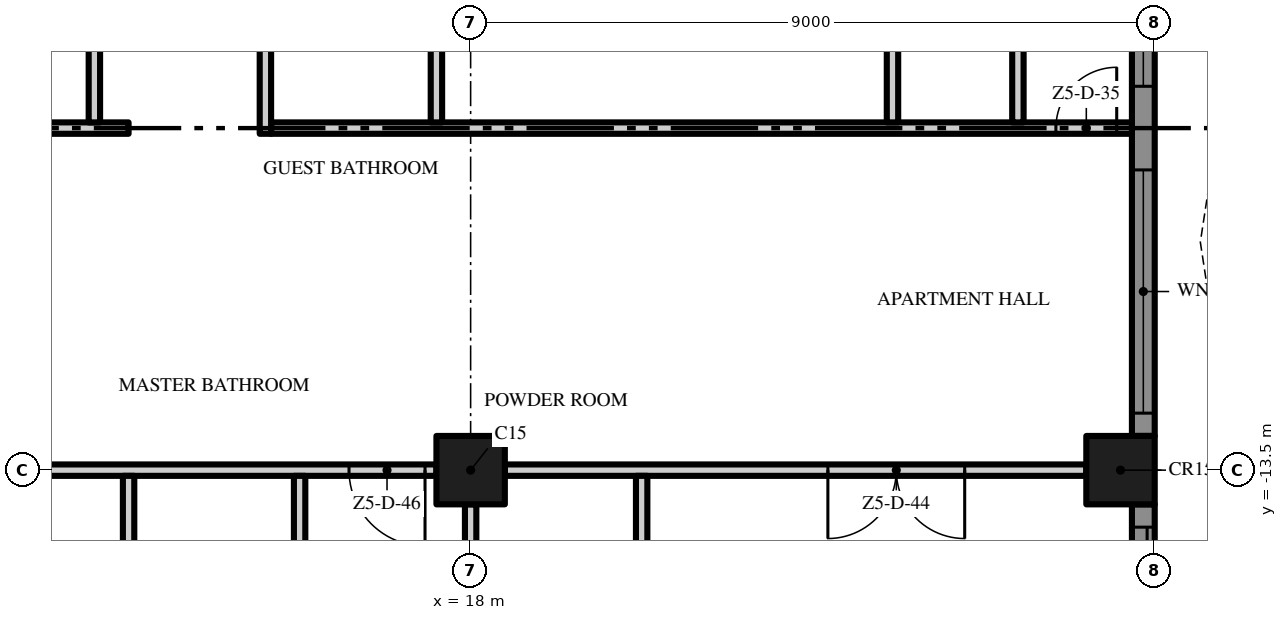
"""IFC4 building model, lengths in metres.
Left out: names, types, materials, properties, quantities, classifications, styles, units other than length and angle.
Written with IfcOpenShell. Run it as: python <this file> out.ifc"""

import sys

from ifc_helpers import new_model, si_unit, direction, frame, frame_2d, origin, origin_2d, place, context, subcontext, project, spatial, polyline, rectangle, outline, extrude, element, fill, save


model = new_model("IFC4")
c1 = context("Model", 3, precision=1e-05, world=origin(), true_north=direction((0.0, 1.0)))
c2 = subcontext(c1, "Body", "Model", "MODEL_VIEW")
j1 = project(units=[si_unit("LENGTHUNIT", "METRE"), si_unit("PLANEANGLEUNIT", "RADIAN")], contexts=[c1])
p1 = place(None, origin())
s1 = spatial("IfcSite", under=j1, at=p1, CompositionType="ELEMENT")
p2 = place(p1, origin())
s2 = spatial("IfcBuilding", under=s1, at=p2, CompositionType="ELEMENT")
p3 = place(p2, frame((0.0, 0.0, 280.6)))
s3 = spatial("IfcBuildingStorey", under=s2, at=p3, CompositionType="ELEMENT", Elevation=280.6)
for number, where, z_axis, x_axis in (
    (1, (18.0, -13.5, 0.0), (0.0, 0.0, 1.0), (1.0, 0.0, 0.0)),
    (2, (26.55, -13.5, 0.0), (0.0, 0.0, 1.0), (1.0, 0.0, 0.0)),
):
    element("IfcColumn", number, at=place(p3, frame(where, z_axis=z_axis, x_axis=x_axis)), inside=s3, PredefinedType="COLUMN", context=c2, shape_type="SweptSolid", body=[
        extrude(rectangle(XDim=0.9, YDim=0.9, at=origin_2d()), origin(), (0.0, 0.0, 1.0), 3.5),
    ])
p4 = place(p3, frame((26.85, -13.95, 0.0), z_axis=(0.0, 0.0, 1.0), x_axis=(0.0, -1.0, 0.0)))
e3 = element("IfcWall", 3, at=p4, inside=s3, PredefinedType="SOLIDWALL", context=c2, shape_type="SweptSolid", body=[
    extrude(rectangle(XDim=3.75, YDim=0.3, at=frame_2d((1.875, 0.0))), origin(), (0.0, 0.0, 1.0), 3.5),
])
p5 = place(p4, frame((0.3, 0.0, 0.0)))
e4 = element("IfcOpeningElement", 4, at=p5, cuts=e3, PredefinedType="OPENING", context=c2, shape_type="SweptSolid", body=[
    extrude(rectangle(XDim=3.15, YDim=2.4, at=frame_2d((1.575, 1.2))), frame((0.0, 0.16, 0.0), z_axis=(0.0, -1.0, 0.0), x_axis=(1.0, 0.0, 0.0)), (0.0, 0.0, 1.0), 0.32),
])
p6 = place(p3, frame((26.85, -4.95, 0.0), z_axis=(0.0, 0.0, 1.0), x_axis=(0.0, -1.0, 0.0)))
e5 = element("IfcWall", 5, at=p6, inside=s3, PredefinedType="SOLIDWALL", context=c2, shape_type="SweptSolid", body=[
    extrude(rectangle(XDim=8.1, YDim=0.3, at=frame_2d((4.05, 0.0))), origin(), (0.0, 0.0, 1.0), 3.5),
])
p7 = place(p6, frame((4.6, 0.0, 0.45)))
e6 = element("IfcOpeningElement", 6, at=p7, cuts=e5, PredefinedType="OPENING", context=c2, shape_type="SweptSolid", body=[
    extrude(rectangle(XDim=3.2, YDim=2.65, at=frame_2d((1.6, 1.325))), frame((0.0, 0.16, 0.0), z_axis=(0.0, -1.0, 0.0), x_axis=(1.0, 0.0, 0.0)), (0.0, 0.0, 1.0), 0.32),
])
p8 = place(p6, frame((0.3, 0.0, 0.45)))
e7 = element("IfcOpeningElement", 7, at=p8, cuts=e5, PredefinedType="OPENING", context=c2, shape_type="SweptSolid", body=[
    extrude(rectangle(XDim=3.2, YDim=2.65, at=frame_2d((1.6, 1.325))), frame((0.0, 0.16, 0.0), z_axis=(0.0, -1.0, 0.0), x_axis=(1.0, 0.0, 0.0)), (0.0, 0.0, 1.0), 0.32),
])
p9 = place(p3, origin())
e8 = element("IfcWall", 8, at=p9, inside=s3, PredefinedType="USERDEFINED", context=c2, shape_type="SweptSolid", body=[
    extrude(outline(polyline([(30.0, -18.0), (29.771, -16.5), (29.171, -15.0), (28.429, -13.5), (27.829, -12.0), (27.6, -10.5), (27.829, -9.0), (28.429, -7.5), (29.171, -6.0), (29.771, -4.5), (30.0, -3.0), (29.771, -1.5), (29.171, 0.0), (28.429, 1.5), (27.829, 3.0), (27.6, 4.5), (27.829, 6.0), (28.429, 7.5), (29.171, 9.0), (29.771, 10.5), (30.0, 12.0), (29.771, 13.5), (29.171, 15.0), (28.429, 16.5), (27.829, 18.0), (27.597, 17.907), (28.201, 16.398), (28.942, 14.898), (29.528, 13.434), (29.747, 12.0), (29.528, 10.566), (28.942, 9.102), (28.201, 7.602), (27.586, 6.066), (27.347, 4.5), (27.586, 2.934), (28.201, 1.398), (28.942, -0.102), (29.528, -1.566), (29.747, -3.0), (29.528, -4.434), (28.942, -5.898), (28.201, -7.398), (27.586, -8.934), (27.347, -10.5), (27.586, -12.066), (28.201, -13.602), (28.942, -15.102), (29.528, -16.566), (29.753, -18.038), (30.0, -18.0)])), origin(), (0.0, 0.0, 1.0), 0.9),
])
p10 = place(p3, frame((17.55, -13.5, 0.0), z_axis=(0.0, 0.0, 1.0), x_axis=(-1.0, 0.0, 0.0)))
e9 = element("IfcWall", 9, at=p10, inside=s3, PredefinedType="PARTITIONING", context=c2, shape_type="SweptSolid", body=[
    extrude(rectangle(XDim=8.1, YDim=0.15, at=frame_2d((4.05, 0.0))), origin(), (0.0, 0.0, 1.0), 3.5),
])
p11 = place(p10, frame((0.15, 0.0, 0.0)))
e10 = element("IfcOpeningElement", 10, at=p11, cuts=e9, PredefinedType="OPENING", context=c2, shape_type="SweptSolid", body=[
    extrude(rectangle(XDim=1.0, YDim=2.4, at=frame_2d((0.5, 1.2))), frame((0.0, 0.085, 0.0), z_axis=(0.0, -1.0, 0.0), x_axis=(1.0, 0.0, 0.0)), (0.0, 0.0, 1.0), 0.17),
])
p12 = place(p10, frame((6.95, 0.0, 0.0)))
e11 = element("IfcOpeningElement", 11, at=p12, cuts=e9, PredefinedType="OPENING", context=c2, shape_type="SweptSolid", body=[
    extrude(rectangle(XDim=1.0, YDim=2.4, at=frame_2d((0.5, 1.2))), frame((0.0, 0.085, 0.0), z_axis=(0.0, -1.0, 0.0), x_axis=(1.0, 0.0, 0.0)), (0.0, 0.0, 1.0), 0.17),
])
p13 = place(p3, frame((26.1, -13.5, 0.0), z_axis=(0.0, 0.0, 1.0), x_axis=(-1.0, 0.0, 0.0)))
e12 = element("IfcWall", 12, at=p13, inside=s3, PredefinedType="PARTITIONING", context=c2, shape_type="SweptSolid", body=[
    extrude(rectangle(XDim=7.65, YDim=0.15, at=frame_2d((3.825, 0.0))), origin(), (0.0, 0.0, 1.0), 3.5),
])
p14 = place(p13, frame((1.6, 0.0, 0.0)))
e13 = element("IfcOpeningElement", 13, at=p14, cuts=e12, PredefinedType="OPENING", context=c2, shape_type="SweptSolid", body=[
    extrude(rectangle(XDim=1.8, YDim=2.4, at=frame_2d((0.9, 1.2))), frame((0.0, 0.085, 0.0), z_axis=(0.0, -1.0, 0.0), x_axis=(1.0, 0.0, 0.0)), (0.0, 0.0, 1.0), 0.17),
])
p15 = place(p3, frame((0.1, -9.0, 0.0), z_axis=(0.0, 0.0, 1.0), x_axis=(1.0, 0.0, 0.0)))
e14 = element("IfcWall", 14, at=p15, inside=s3, PredefinedType="PARTITIONING", context=c2, shape_type="SweptSolid", body=[
    extrude(rectangle(XDim=13.4, YDim=0.15, at=frame_2d((6.7, 0.0))), origin(), (0.0, 0.0, 1.0), 3.5),
])
p16 = place(p15, frame((11.2, 0.0, 0.0)))
e15 = element("IfcOpeningElement", 15, at=p16, cuts=e14, PredefinedType="OPENING", context=c2, shape_type="SweptSolid", body=[
    extrude(rectangle(XDim=0.8, YDim=2.0, at=frame_2d((0.4, 1.0))), frame((0.0, 0.085, 0.0), z_axis=(0.0, -1.0, 0.0), x_axis=(1.0, 0.0, 0.0)), (0.0, 0.0, 1.0), 0.17),
])
p17 = place(p15, frame((8.55, 0.0, 0.0)))
e16 = element("IfcOpeningElement", 16, at=p17, cuts=e14, PredefinedType="OPENING", context=c2, shape_type="SweptSolid", body=[
    extrude(rectangle(XDim=0.8, YDim=2.0, at=frame_2d((0.4, 1.0))), frame((0.0, 0.085, 0.0), z_axis=(0.0, -1.0, 0.0), x_axis=(1.0, 0.0, 0.0)), (0.0, 0.0, 1.0), 0.17),
])
p18 = place(p15, frame((5.8, 0.0, 0.0)))
e17 = element("IfcOpeningElement", 17, at=p18, cuts=e14, PredefinedType="OPENING", context=c2, shape_type="SweptSolid", body=[
    extrude(rectangle(XDim=0.8, YDim=2.0, at=frame_2d((0.4, 1.0))), frame((0.0, 0.085, 0.0), z_axis=(0.0, -1.0, 0.0), x_axis=(1.0, 0.0, 0.0)), (0.0, 0.0, 1.0), 0.17),
])
p19 = place(p3, frame((15.375, -9.0, 0.0), z_axis=(0.0, 0.0, 1.0), x_axis=(1.0, 0.0, 0.0)))
e18 = element("IfcWall", 18, at=p19, inside=s3, PredefinedType="PARTITIONING", context=c2, shape_type="SweptSolid", body=[
    extrude(rectangle(XDim=11.325, YDim=0.15, at=frame_2d((5.662, 0.0))), origin(), (0.0, 0.0, 1.0), 3.5),
])
p20 = place(p19, frame((10.325, 0.0, 0.0)))
e19 = element("IfcOpeningElement", 19, at=p20, cuts=e18, PredefinedType="OPENING", context=c2, shape_type="SweptSolid", body=[
    extrude(rectangle(XDim=0.8, YDim=2.0, at=frame_2d((0.4, 1.0))), frame((0.0, 0.085, 0.0), z_axis=(0.0, -1.0, 0.0), x_axis=(1.0, 0.0, 0.0)), (0.0, 0.0, 1.0), 0.17),
])
p21 = place(p3, frame((13.05, -8.925, 0.0), z_axis=(0.0, 0.0, 1.0), x_axis=(0.0, 1.0, 0.0)))
e20 = element("IfcWall", 20, at=p21, inside=s3, PredefinedType="PARTITIONING", context=c2, shape_type="SweptSolid", body=[
    extrude(rectangle(XDim=4.5, YDim=0.15, at=frame_2d((2.25, 0.0))), origin(), (0.0, 0.0, 1.0), 3.5),
])
p22 = place(p3, frame((13.5, -22.2, 0.0), z_axis=(0.0, 0.0, 1.0), x_axis=(0.0, 1.0, 0.0)))
e21 = element("IfcWall", 21, at=p22, inside=s3, PredefinedType="PARTITIONING", context=c2, shape_type="SweptSolid", body=[
    extrude(rectangle(XDim=8.625, YDim=0.15, at=frame_2d((4.312, 0.0))), origin(), (0.0, 0.0, 1.0), 3.5),
])
p23 = place(p3, frame((15.3, -4.425, 0.0), z_axis=(0.0, 0.0, 1.0), x_axis=(0.0, -1.0, 0.0)))
e22 = element("IfcWall", 22, at=p23, inside=s3, PredefinedType="PARTITIONING", context=c2, shape_type="SweptSolid", body=[
    extrude(rectangle(XDim=4.65, YDim=0.15, at=frame_2d((2.325, 0.0))), origin(), (0.0, 0.0, 1.0), 3.5),
])
p24 = place(p23, frame((1.875, 0.0, 0.0)))
e23 = element("IfcOpeningElement", 23, at=p24, cuts=e22, PredefinedType="OPENING", context=c2, shape_type="SweptSolid", body=[
    extrude(rectangle(XDim=0.9, YDim=2.1, at=frame_2d((0.45, 1.05))), frame((0.0, 0.085, 0.0), z_axis=(0.0, -1.0, 0.0), x_axis=(1.0, 0.0, 0.0)), (0.0, 0.0, 1.0), 0.17),
])
p25 = place(p3, frame((15.75, -16.575, 0.0), z_axis=(0.0, 0.0, 1.0), x_axis=(0.0, 1.0, 0.0)))
e24 = element("IfcWall", 24, at=p25, inside=s3, PredefinedType="PARTITIONING", context=c2, shape_type="SweptSolid", body=[
    extrude(rectangle(XDim=3.0, YDim=0.15, at=frame_2d((1.5, 0.0))), origin(), (0.0, 0.0, 1.0), 3.5),
])
p26 = place(p3, frame((17.55, -8.925, 0.0), z_axis=(0.0, 0.0, 1.0), x_axis=(0.0, 1.0, 0.0)))
e25 = element("IfcWall", 25, at=p26, inside=s3, PredefinedType="PARTITIONING", context=c2, shape_type="SweptSolid", body=[
    extrude(rectangle(XDim=3.975, YDim=0.15, at=frame_2d((1.988, 0.0))), origin(), (0.0, 0.0, 1.0), 3.5),
])
p27 = place(p3, frame((18.0, -21.6, 0.0), z_axis=(0.0, 0.0, 1.0), x_axis=(0.0, 1.0, 0.0)))
e26 = element("IfcWall", 26, at=p27, inside=s3, PredefinedType="PARTITIONING", context=c2, shape_type="SweptSolid", body=[
    extrude(rectangle(XDim=7.65, YDim=0.15, at=frame_2d((3.825, 0.0))), origin(), (0.0, 0.0, 1.0), 3.5),
])
p28 = place(p3, frame((20.25, -16.575, 0.0), z_axis=(0.0, 0.0, 1.0), x_axis=(0.0, 1.0, 0.0)))
e27 = element("IfcWall", 27, at=p28, inside=s3, PredefinedType="PARTITIONING", context=c2, shape_type="SweptSolid", body=[
    extrude(rectangle(XDim=3.0, YDim=0.15, at=frame_2d((1.5, 0.0))), origin(), (0.0, 0.0, 1.0), 3.5),
])
for number, where, z_axis, x_axis in (
    (28, (23.55, -8.925, 0.0), (0.0, 0.0, 1.0), (0.0, 1.0, 0.0)),
    (29, (25.2, -8.925, 0.0), (0.0, 0.0, 1.0), (0.0, 1.0, 0.0)),
):
    element("IfcWall", number, at=place(p3, frame(where, z_axis=z_axis, x_axis=x_axis)), inside=s3, PredefinedType="PARTITIONING", context=c2, shape_type="SweptSolid", body=[
        extrude(rectangle(XDim=4.35, YDim=0.15, at=frame_2d((2.175, 0.0))), origin(), (0.0, 0.0, 1.0), 3.5),
    ])
p29 = place(p5, origin())
e30 = element("IfcDoor", 30, at=p29, inside=s3, OperationType="SINGLE_SWING_LEFT", PredefinedType="DOOR", context=c2, shape_type="SweptSolid", body=[
    extrude(rectangle(XDim=3.15, YDim=2.4, at=frame_2d((1.575, 1.2))), frame((0.0, 0.025, 0.0), z_axis=(0.0, -1.0, 0.0), x_axis=(1.0, 0.0, 0.0)), (0.0, 0.0, 1.0), 0.05),
])
fill(e4, e30)
p30 = place(p7, origin())
e31 = element("IfcWindow", 31, at=p30, inside=s3, PartitioningType="SINGLE_PANEL", PredefinedType="WINDOW", context=c2, shape_type="SweptSolid", body=[
    extrude(rectangle(XDim=3.2, YDim=2.65, at=frame_2d((1.6, 1.325))), frame((0.0, 0.03, 0.0), z_axis=(0.0, -1.0, 0.0), x_axis=(1.0, 0.0, 0.0)), (0.0, 0.0, 1.0), 0.06),
])
fill(e6, e31)
p31 = place(p8, origin())
e32 = element("IfcWindow", 32, at=p31, inside=s3, PartitioningType="SINGLE_PANEL", PredefinedType="WINDOW", context=c2, shape_type="SweptSolid", body=[
    extrude(rectangle(XDim=3.2, YDim=2.65, at=frame_2d((1.6, 1.325))), frame((0.0, 0.03, 0.0), z_axis=(0.0, -1.0, 0.0), x_axis=(1.0, 0.0, 0.0)), (0.0, 0.0, 1.0), 0.06),
])
fill(e7, e32)
p32 = place(p20, origin())
e33 = element("IfcDoor", 33, at=p32, inside=s3, OperationType="SINGLE_SWING_RIGHT", PredefinedType="DOOR", context=c2, shape_type="SweptSolid", body=[
    extrude(rectangle(XDim=0.8, YDim=2.0, at=frame_2d((0.4, 1.0))), frame((0.0, 0.025, 0.0), z_axis=(0.0, -1.0, 0.0), x_axis=(1.0, 0.0, 0.0)), (0.0, 0.0, 1.0), 0.05),
])
fill(e19, e33)
p33 = place(p14, origin())
e34 = element("IfcDoor", 34, at=p33, inside=s3, OperationType="DOUBLE_DOOR_SINGLE_SWING", PredefinedType="DOOR", context=c2, shape_type="SweptSolid", body=[
    extrude(rectangle(XDim=1.8, YDim=2.4, at=frame_2d((0.9, 1.2))), frame((0.0, 0.025, 0.0), z_axis=(0.0, -1.0, 0.0), x_axis=(1.0, 0.0, 0.0)), (0.0, 0.0, 1.0), 0.05),
])
fill(e13, e34)
p34 = place(p11, origin())
e35 = element("IfcDoor", 35, at=p34, inside=s3, OperationType="SINGLE_SWING_LEFT", PredefinedType="DOOR", context=c2, shape_type="SweptSolid", body=[
    extrude(rectangle(XDim=1.0, YDim=2.4, at=frame_2d((0.5, 1.2))), frame((0.0, 0.025, 0.0), z_axis=(0.0, -1.0, 0.0), x_axis=(1.0, 0.0, 0.0)), (0.0, 0.0, 1.0), 0.05),
])
fill(e10, e35)
save(model, sys.argv[1])
